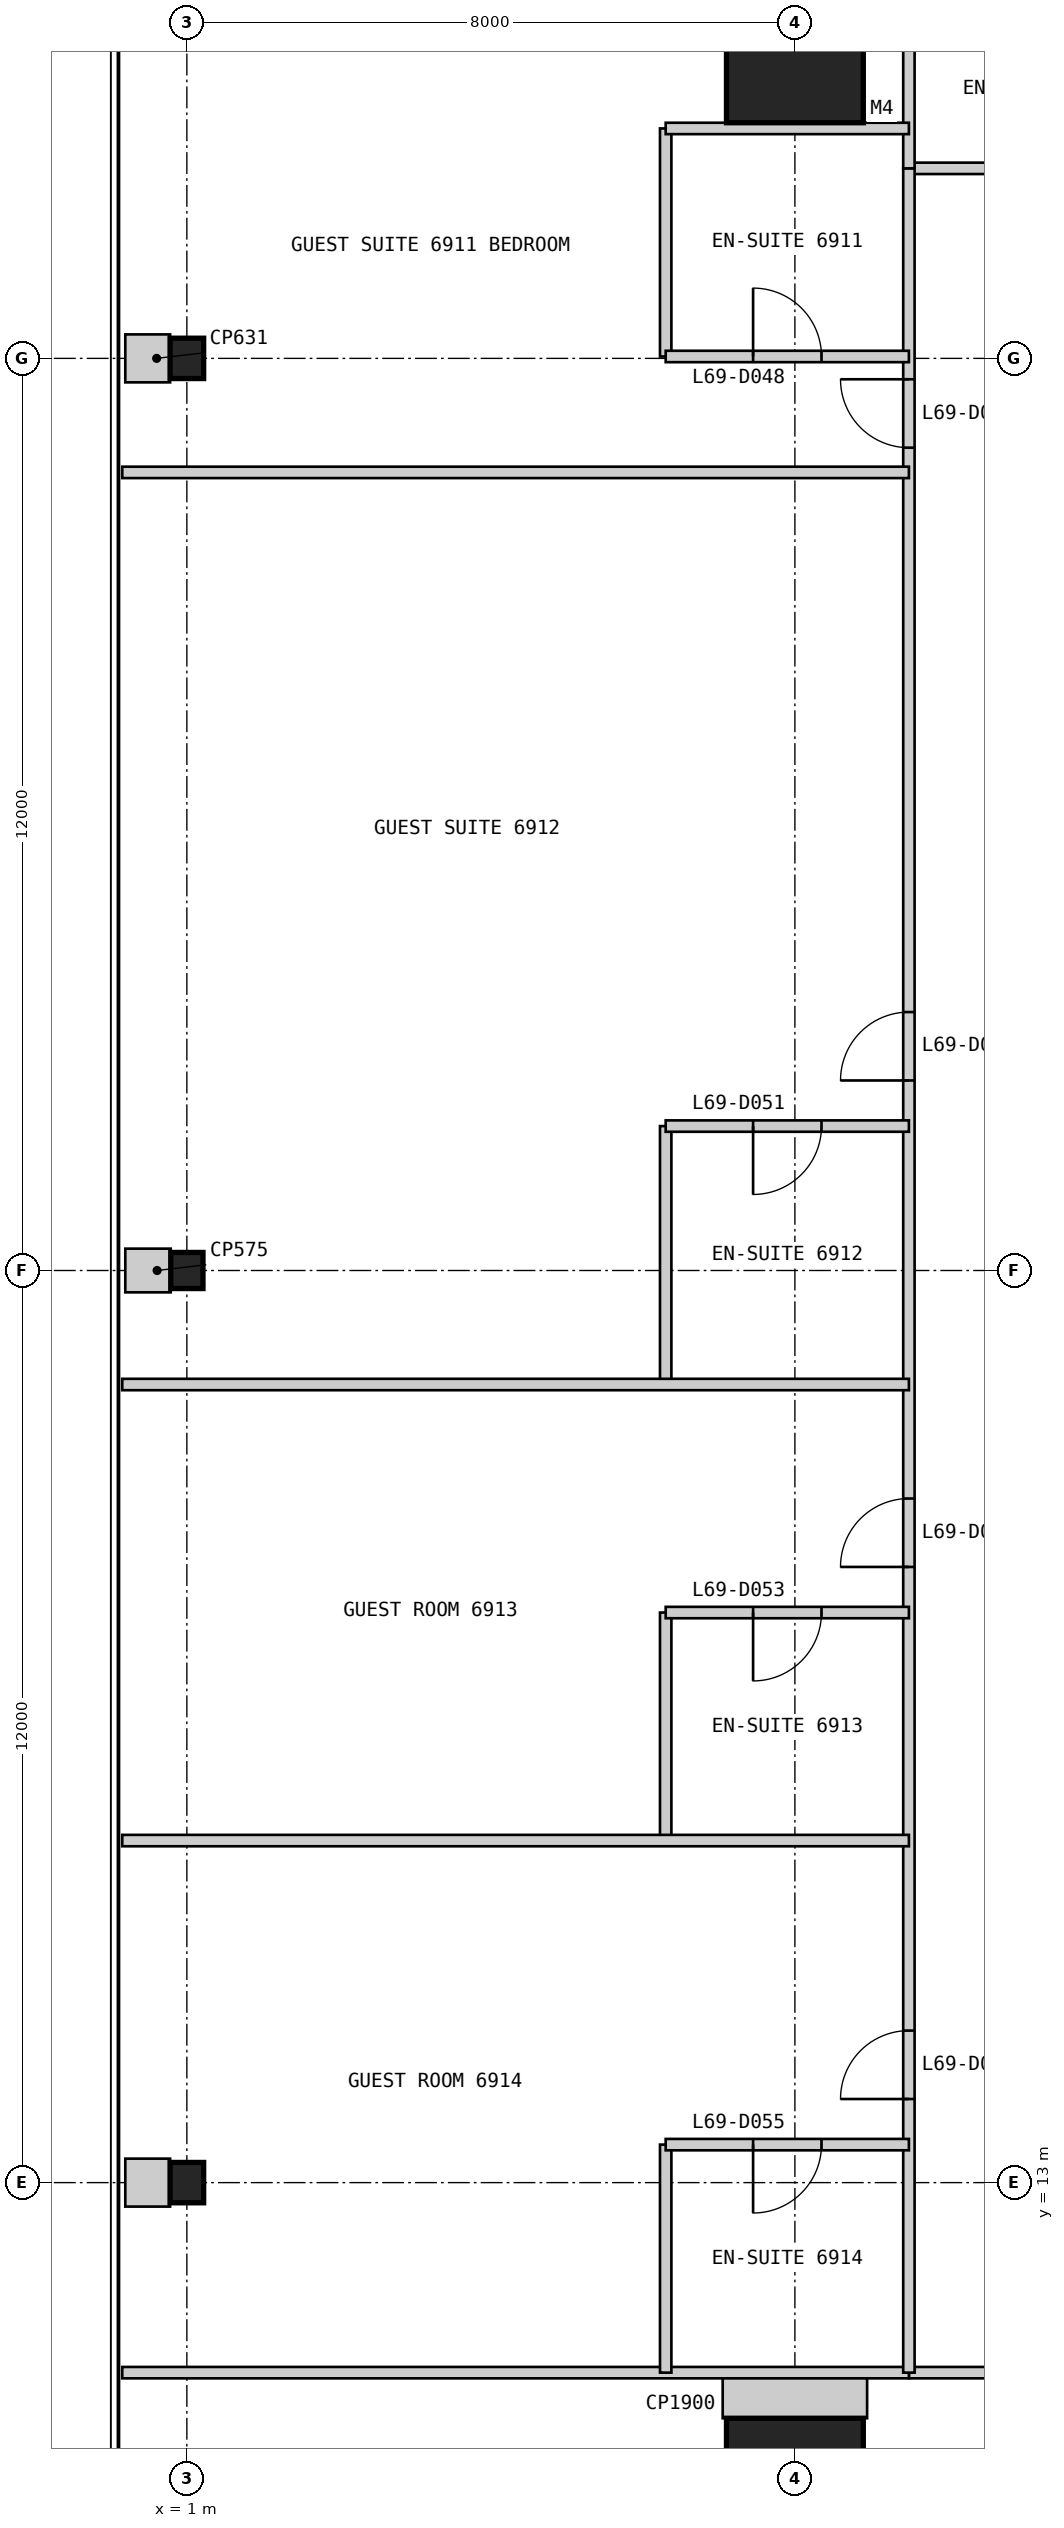
"""IFC4 building model, lengths in metres.
Left out: names, types, materials, properties, quantities, classifications, styles, units other than length and angle.
Written with IfcOpenShell. Run it as: python <this file> out.ifc"""

import sys

from ifc_helpers import new_model, si_unit, direction, frame, frame_2d, origin, origin_2d, place, context, subcontext, project, spatial, rectangle, i_section, extrude, element, fill, save


model = new_model("IFC4")
c1 = context("Model", 3, precision=1e-05, world=origin(), true_north=direction((0.0, 1.0)))
c2 = subcontext(c1, "Body", "Model", "MODEL_VIEW")
j1 = project(units=[si_unit("LENGTHUNIT", "METRE"), si_unit("PLANEANGLEUNIT", "RADIAN")], contexts=[c1])
p1 = place(None, origin())
s1 = spatial("IfcSite", under=j1, at=p1, CompositionType="ELEMENT")
p2 = place(p1, origin())
s2 = spatial("IfcBuilding", under=s1, at=p2, CompositionType="ELEMENT")
p3 = place(p2, frame((0.0, 0.0, 286.6)))
s3 = spatial("IfcBuildingStorey", under=s2, at=p3, CompositionType="ELEMENT", Elevation=286.6)
for number, where, z_axis, x_axis in (
    (1, (9.0, 9.0, 0.0), (0.0, 0.0, 1.0), (1.0, 0.0, 0.0)),
    (2, (9.0, 41.0, 0.0), (0.0, 0.0, 1.0), (1.0, 0.0, 0.0)),
):
    element("IfcColumn", number, at=place(p3, frame(where, z_axis=z_axis, x_axis=x_axis)), inside=s3, PredefinedType="COLUMN", context=c2, shape_type="SweptSolid", body=[
        extrude(rectangle(XDim=1.8, YDim=1.8, at=origin_2d()), origin(), (0.0, 0.0, 1.0), 3.4),
    ])
p4 = place(p3, frame((1.0, 37.0, 0.0), z_axis=(0.0, 0.0, 1.0), x_axis=(1.0, 0.0, 0.0)))
e3 = element("IfcColumn", 3, at=p4, inside=s3, PredefinedType="COLUMN", context=c2, shape_type="SweptSolid", body=[
    extrude(i_section(OverallWidth=0.442, OverallDepth=0.531, WebThickness=0.066, FlangeThickness=0.106, at=origin_2d()), origin(), (0.0, 0.0, 1.0), 3.4),
])
p5 = place(p3, frame((1.0, 25.0, 0.0), z_axis=(0.0, 0.0, 1.0), x_axis=(1.0, 0.0, 0.0)))
e4 = element("IfcColumn", 4, at=p5, inside=s3, PredefinedType="COLUMN", context=c2, shape_type="SweptSolid", body=[
    extrude(i_section(OverallWidth=0.424, OverallDepth=0.475, WebThickness=0.048, FlangeThickness=0.077, at=origin_2d()), origin(), (0.0, 0.0, 1.0), 3.4),
])
p6 = place(p3, frame((1.0, 13.0, 0.0), z_axis=(0.0, 0.0, 1.0), x_axis=(1.0, 0.0, 0.0)))
e5 = element("IfcColumn", 5, at=p6, inside=s3, PredefinedType="COLUMN", context=c2, shape_type="SweptSolid", body=[
    extrude(i_section(OverallWidth=0.442, OverallDepth=0.531, WebThickness=0.066, FlangeThickness=0.106, at=origin_2d()), origin(), (0.0, 0.0, 1.0), 3.4),
])
p7 = place(p3, frame((10.5, 10.5, 0.0), z_axis=(0.0, 0.0, 1.0), x_axis=(1.0, 0.0, 0.0)))
e6 = element("IfcWall", 6, at=p7, inside=s3, PredefinedType="PARTITIONING", context=c2, shape_type="SweptSolid", body=[
    extrude(rectangle(XDim=29.0, YDim=0.15, at=frame_2d((14.5, 0.0))), origin(), (0.0, 0.0, 1.0), 3.25),
])
p8 = place(p7, frame((1.85, 0.0, 0.0)))
e7 = element("IfcOpeningElement", 7, at=p8, cuts=e6, PredefinedType="OPENING", context=c2, shape_type="SweptSolid", body=[
    extrude(rectangle(XDim=0.9, YDim=2.1, at=frame_2d((0.45, 1.05))), frame((0.0, 0.085, 0.0), z_axis=(0.0, -1.0, 0.0), x_axis=(1.0, 0.0, 0.0)), (0.0, 0.0, 1.0), 0.17),
])
p9 = place(p7, frame((11.5, 0.0, 0.0)))
e8 = element("IfcOpeningElement", 8, at=p9, cuts=e6, PredefinedType="OPENING", context=c2, shape_type="SweptSolid", body=[
    extrude(rectangle(XDim=0.9, YDim=2.1, at=frame_2d((0.45, 1.05))), frame((0.0, 0.085, 0.0), z_axis=(0.0, -1.0, 0.0), x_axis=(1.0, 0.0, 0.0)), (0.0, 0.0, 1.0), 0.17),
])
p10 = place(p7, frame((24.1, 0.0, 0.0)))
e9 = element("IfcOpeningElement", 9, at=p10, cuts=e6, PredefinedType="OPENING", context=c2, shape_type="SweptSolid", body=[
    extrude(rectangle(XDim=0.9, YDim=2.1, at=frame_2d((0.45, 1.05))), frame((0.0, 0.085, 0.0), z_axis=(0.0, -1.0, 0.0), x_axis=(1.0, 0.0, 0.0)), (0.0, 0.0, 1.0), 0.17),
])
p11 = place(p3, frame((0.15, 10.5, 0.0), z_axis=(0.0, 0.0, 1.0), x_axis=(1.0, 0.0, 0.0)))
e10 = element("IfcWall", 10, at=p11, inside=s3, PredefinedType="PARTITIONING", context=c2, shape_type="SweptSolid", body=[
    extrude(rectangle(XDim=10.35, YDim=0.15, at=frame_2d((5.175, 0.0))), origin(), (0.0, 0.0, 1.0), 3.25),
])
p12 = place(p3, frame((39.5, 39.5, 0.0), z_axis=(0.0, 0.0, 1.0), x_axis=(-1.0, 0.0, 0.0)))
e11 = element("IfcWall", 11, at=p12, inside=s3, PredefinedType="PARTITIONING", context=c2, shape_type="SweptSolid", body=[
    extrude(rectangle(XDim=29.0, YDim=0.15, at=frame_2d((14.5, 0.0))), origin(), (0.0, 0.0, 1.0), 3.25),
])
p13 = place(p12, frame((1.85, 0.0, 0.0)))
e12 = element("IfcOpeningElement", 12, at=p13, cuts=e11, PredefinedType="OPENING", context=c2, shape_type="SweptSolid", body=[
    extrude(rectangle(XDim=0.9, YDim=2.1, at=frame_2d((0.45, 1.05))), frame((0.0, 0.085, 0.0), z_axis=(0.0, -1.0, 0.0), x_axis=(1.0, 0.0, 0.0)), (0.0, 0.0, 1.0), 0.17),
])
p14 = place(p12, frame((11.5, 0.0, 0.0)))
e13 = element("IfcOpeningElement", 13, at=p14, cuts=e11, PredefinedType="OPENING", context=c2, shape_type="SweptSolid", body=[
    extrude(rectangle(XDim=0.9, YDim=2.1, at=frame_2d((0.45, 1.05))), frame((0.0, 0.085, 0.0), z_axis=(0.0, -1.0, 0.0), x_axis=(1.0, 0.0, 0.0)), (0.0, 0.0, 1.0), 0.17),
])
p15 = place(p12, frame((24.1, 0.0, 0.0)))
e14 = element("IfcOpeningElement", 14, at=p15, cuts=e11, PredefinedType="OPENING", context=c2, shape_type="SweptSolid", body=[
    extrude(rectangle(XDim=0.9, YDim=2.1, at=frame_2d((0.45, 1.05))), frame((0.0, 0.085, 0.0), z_axis=(0.0, -1.0, 0.0), x_axis=(1.0, 0.0, 0.0)), (0.0, 0.0, 1.0), 0.17),
])
p16 = place(p3, frame((10.5, 39.5, 0.0), z_axis=(0.0, 0.0, 1.0), x_axis=(0.0, -1.0, 0.0)))
e15 = element("IfcWall", 15, at=p16, inside=s3, PredefinedType="PARTITIONING", context=c2, shape_type="SweptSolid", body=[
    extrude(rectangle(XDim=29.0, YDim=0.15, at=frame_2d((14.5, 0.0))), origin(), (0.0, 0.0, 1.0), 3.25),
])
p17 = place(p16, frame((2.775, 0.0, 0.0)))
e16 = element("IfcOpeningElement", 16, at=p17, cuts=e15, PredefinedType="OPENING", context=c2, shape_type="SweptSolid", body=[
    extrude(rectangle(XDim=0.9, YDim=2.1, at=frame_2d((0.45, 1.05))), frame((0.0, 0.085, 0.0), z_axis=(0.0, -1.0, 0.0), x_axis=(1.0, 0.0, 0.0)), (0.0, 0.0, 1.0), 0.17),
])
p18 = place(p16, frame((11.1, 0.0, 0.0)))
e17 = element("IfcOpeningElement", 17, at=p18, cuts=e15, PredefinedType="OPENING", context=c2, shape_type="SweptSolid", body=[
    extrude(rectangle(XDim=0.9, YDim=2.1, at=frame_2d((0.45, 1.05))), frame((0.0, 0.085, 0.0), z_axis=(0.0, -1.0, 0.0), x_axis=(1.0, 0.0, 0.0)), (0.0, 0.0, 1.0), 0.17),
])
p19 = place(p16, frame((17.5, 0.0, 0.0)))
e18 = element("IfcOpeningElement", 18, at=p19, cuts=e15, PredefinedType="OPENING", context=c2, shape_type="SweptSolid", body=[
    extrude(rectangle(XDim=0.9, YDim=2.1, at=frame_2d((0.45, 1.05))), frame((0.0, 0.085, 0.0), z_axis=(0.0, -1.0, 0.0), x_axis=(1.0, 0.0, 0.0)), (0.0, 0.0, 1.0), 0.17),
])
p20 = place(p16, frame((24.5, 0.0, 0.0)))
e19 = element("IfcOpeningElement", 19, at=p20, cuts=e15, PredefinedType="OPENING", context=c2, shape_type="SweptSolid", body=[
    extrude(rectangle(XDim=0.9, YDim=2.1, at=frame_2d((0.45, 1.05))), frame((0.0, 0.085, 0.0), z_axis=(0.0, -1.0, 0.0), x_axis=(1.0, 0.0, 0.0)), (0.0, 0.0, 1.0), 0.17),
])
p21 = place(p3, frame((10.5, 49.85, 0.0), z_axis=(0.0, 0.0, 1.0), x_axis=(0.0, -1.0, 0.0)))
e20 = element("IfcWall", 20, at=p21, inside=s3, PredefinedType="PARTITIONING", context=c2, shape_type="SweptSolid", body=[
    extrude(rectangle(XDim=10.35, YDim=0.15, at=frame_2d((5.175, 0.0))), origin(), (0.0, 0.0, 1.0), 3.25),
])
p22 = place(p3, frame((7.3, 40.025, 0.0), z_axis=(0.0, 0.0, 1.0), x_axis=(0.0, -1.0, 0.0)))
e21 = element("IfcWall", 21, at=p22, inside=s3, PredefinedType="PARTITIONING", context=c2, shape_type="SweptSolid", body=[
    extrude(rectangle(XDim=3.0, YDim=0.15, at=frame_2d((1.5, 0.0))), origin(), (0.0, 0.0, 1.0), 3.25),
])
p23 = place(p3, frame((7.3, 37.025, 0.0), z_axis=(0.0, 0.0, 1.0), x_axis=(1.0, 0.0, 0.0)))
e22 = element("IfcWall", 22, at=p23, inside=s3, PredefinedType="PARTITIONING", context=c2, shape_type="SweptSolid", body=[
    extrude(rectangle(XDim=3.2, YDim=0.15, at=frame_2d((1.6, 0.0))), origin(), (0.0, 0.0, 1.0), 2.404),
])
p24 = place(p23, frame((1.15, 0.0, 0.0)))
e23 = element("IfcOpeningElement", 23, at=p24, cuts=e22, PredefinedType="OPENING", context=c2, shape_type="SweptSolid", body=[
    extrude(rectangle(XDim=0.9, YDim=2.1, at=frame_2d((0.45, 1.05))), frame((0.0, 0.085, 0.0), z_axis=(0.0, -1.0, 0.0), x_axis=(1.0, 0.0, 0.0)), (0.0, 0.0, 1.0), 0.17),
])
p25 = place(p3, frame((7.3, 40.025, 0.0), z_axis=(0.0, 0.0, 1.0), x_axis=(1.0, 0.0, 0.0)))
e24 = element("IfcWall", 24, at=p25, inside=s3, PredefinedType="PARTITIONING", context=c2, shape_type="SweptSolid", body=[
    extrude(rectangle(XDim=3.2, YDim=0.15, at=frame_2d((1.6, 0.0))), origin(), (0.0, 0.0, 1.0), 3.25),
])
p26 = place(p3, frame((0.15, 35.5, 0.0), z_axis=(0.0, 0.0, 1.0), x_axis=(1.0, 0.0, 0.0)))
e25 = element("IfcWall", 25, at=p26, inside=s3, PredefinedType="PARTITIONING", context=c2, shape_type="SweptSolid", body=[
    extrude(rectangle(XDim=10.35, YDim=0.15, at=frame_2d((5.175, 0.0))), origin(), (0.0, 0.0, 1.0), 3.25),
])
p27 = place(p3, frame((7.3, 26.9, 0.0), z_axis=(0.0, 0.0, 1.0), x_axis=(0.0, -1.0, 0.0)))
e26 = element("IfcWall", 26, at=p27, inside=s3, PredefinedType="PARTITIONING", context=c2, shape_type="SweptSolid", body=[
    extrude(rectangle(XDim=3.4, YDim=0.15, at=frame_2d((1.7, 0.0))), origin(), (0.0, 0.0, 1.0), 3.25),
])
p28 = place(p3, frame((7.3, 26.9, 0.0), z_axis=(0.0, 0.0, 1.0), x_axis=(1.0, 0.0, 0.0)))
e27 = element("IfcWall", 27, at=p28, inside=s3, PredefinedType="PARTITIONING", context=c2, shape_type="SweptSolid", body=[
    extrude(rectangle(XDim=3.2, YDim=0.15, at=frame_2d((1.6, 0.0))), origin(), (0.0, 0.0, 1.0), 3.25),
])
p29 = place(p28, frame((1.15, 0.0, 0.0)))
e28 = element("IfcOpeningElement", 28, at=p29, cuts=e27, PredefinedType="OPENING", context=c2, shape_type="SweptSolid", body=[
    extrude(rectangle(XDim=0.9, YDim=2.1, at=frame_2d((0.45, 1.05))), frame((0.0, 0.085, 0.0), z_axis=(0.0, -1.0, 0.0), x_axis=(1.0, 0.0, 0.0)), (0.0, 0.0, 1.0), 0.17),
])
p30 = place(p3, frame((0.15, 23.5, 0.0), z_axis=(0.0, 0.0, 1.0), x_axis=(1.0, 0.0, 0.0)))
e29 = element("IfcWall", 29, at=p30, inside=s3, PredefinedType="PARTITIONING", context=c2, shape_type="SweptSolid", body=[
    extrude(rectangle(XDim=10.35, YDim=0.15, at=frame_2d((5.175, 0.0))), origin(), (0.0, 0.0, 1.0), 3.25),
])
p31 = place(p3, frame((7.3, 20.5, 0.0), z_axis=(0.0, 0.0, 1.0), x_axis=(0.0, -1.0, 0.0)))
e30 = element("IfcWall", 30, at=p31, inside=s3, PredefinedType="PARTITIONING", context=c2, shape_type="SweptSolid", body=[
    extrude(rectangle(XDim=3.0, YDim=0.15, at=frame_2d((1.5, 0.0))), origin(), (0.0, 0.0, 1.0), 3.25),
])
p32 = place(p3, frame((7.3, 20.5, 0.0), z_axis=(0.0, 0.0, 1.0), x_axis=(1.0, 0.0, 0.0)))
e31 = element("IfcWall", 31, at=p32, inside=s3, PredefinedType="PARTITIONING", context=c2, shape_type="SweptSolid", body=[
    extrude(rectangle(XDim=3.2, YDim=0.15, at=frame_2d((1.6, 0.0))), origin(), (0.0, 0.0, 1.0), 3.25),
])
p33 = place(p32, frame((1.15, 0.0, 0.0)))
e32 = element("IfcOpeningElement", 32, at=p33, cuts=e31, PredefinedType="OPENING", context=c2, shape_type="SweptSolid", body=[
    extrude(rectangle(XDim=0.9, YDim=2.1, at=frame_2d((0.45, 1.05))), frame((0.0, 0.085, 0.0), z_axis=(0.0, -1.0, 0.0), x_axis=(1.0, 0.0, 0.0)), (0.0, 0.0, 1.0), 0.17),
])
p34 = place(p3, frame((0.15, 17.5, 0.0), z_axis=(0.0, 0.0, 1.0), x_axis=(1.0, 0.0, 0.0)))
e33 = element("IfcWall", 33, at=p34, inside=s3, PredefinedType="PARTITIONING", context=c2, shape_type="SweptSolid", body=[
    extrude(rectangle(XDim=10.35, YDim=0.15, at=frame_2d((5.175, 0.0))), origin(), (0.0, 0.0, 1.0), 3.25),
])
p35 = place(p3, frame((7.3, 13.5, 0.0), z_axis=(0.0, 0.0, 1.0), x_axis=(0.0, -1.0, 0.0)))
e34 = element("IfcWall", 34, at=p35, inside=s3, PredefinedType="PARTITIONING", context=c2, shape_type="SweptSolid", body=[
    extrude(rectangle(XDim=3.0, YDim=0.15, at=frame_2d((1.5, 0.0))), origin(), (0.0, 0.0, 1.0), 3.25),
])
p36 = place(p3, frame((7.3, 13.5, 0.0), z_axis=(0.0, 0.0, 1.0), x_axis=(1.0, 0.0, 0.0)))
e35 = element("IfcWall", 35, at=p36, inside=s3, PredefinedType="PARTITIONING", context=c2, shape_type="SweptSolid", body=[
    extrude(rectangle(XDim=3.2, YDim=0.15, at=frame_2d((1.6, 0.0))), origin(), (0.0, 0.0, 1.0), 3.25),
])
p37 = place(p36, frame((1.15, 0.0, 0.0)))
e36 = element("IfcOpeningElement", 36, at=p37, cuts=e35, PredefinedType="OPENING", context=c2, shape_type="SweptSolid", body=[
    extrude(rectangle(XDim=0.9, YDim=2.1, at=frame_2d((0.45, 1.05))), frame((0.0, 0.085, 0.0), z_axis=(0.0, -1.0, 0.0), x_axis=(1.0, 0.0, 0.0)), (0.0, 0.0, 1.0), 0.17),
])
p38 = place(p3, frame((9.0, 10.425, 0.0), z_axis=(0.0, 0.0, 1.0), x_axis=(0.0, -1.0, 0.0)))
e37 = element("IfcWall", 37, at=p38, inside=s3, PredefinedType="PARTITIONING", context=c2, shape_type="SweptSolid", body=[
    extrude(rectangle(XDim=0.525, YDim=1.9, at=frame_2d((0.263, 0.0))), origin(), (0.0, 0.0, 1.0), 3.25),
])
p39 = place(p3, frame((0.19, 37.0, 0.0), z_axis=(0.0, 0.0, 1.0), x_axis=(1.0, 0.0, 0.0)))
e38 = element("IfcWall", 38, at=p39, inside=s3, PredefinedType="PARTITIONING", context=c2, shape_type="SweptSolid", body=[
    extrude(rectangle(XDim=0.589, YDim=0.631, at=frame_2d((0.294, 0.0))), origin(), (0.0, 0.0, 1.0), 3.25),
])
p40 = place(p3, frame((0.19, 25.0, 0.0), z_axis=(0.0, 0.0, 1.0), x_axis=(1.0, 0.0, 0.0)))
e39 = element("IfcWall", 39, at=p40, inside=s3, PredefinedType="PARTITIONING", context=c2, shape_type="SweptSolid", body=[
    extrude(rectangle(XDim=0.598, YDim=0.575, at=frame_2d((0.299, 0.0))), origin(), (0.0, 0.0, 1.0), 3.25),
])
p41 = place(p3, frame((0.19, 13.0, 0.0), z_axis=(0.0, 0.0, 1.0), x_axis=(1.0, 0.0, 0.0)))
e40 = element("IfcWall", 40, at=p41, inside=s3, PredefinedType="PARTITIONING", context=c2, shape_type="SweptSolid", body=[
    extrude(rectangle(XDim=0.589, YDim=0.631, at=frame_2d((0.294, 0.0))), origin(), (0.0, 0.0, 1.0), 3.25),
])
p42 = place(p24, origin())
e41 = element("IfcDoor", 41, at=p42, inside=s3, OperationType="SINGLE_SWING_LEFT", PredefinedType="DOOR", context=c2, shape_type="SweptSolid", body=[
    extrude(rectangle(XDim=0.9, YDim=2.1, at=frame_2d((0.45, 1.05))), frame((0.0, 0.025, 0.0), z_axis=(0.0, -1.0, 0.0), x_axis=(1.0, 0.0, 0.0)), (0.0, 0.0, 1.0), 0.05),
])
fill(e23, e41)
p43 = place(p17, frame((0.9, 0.0, 0.0), z_axis=(0.0, 0.0, 1.0), x_axis=(-1.0, 0.0, 0.0)))
e42 = element("IfcDoor", 42, at=p43, inside=s3, OperationType="SINGLE_SWING_RIGHT", PredefinedType="DOOR", context=c2, shape_type="SweptSolid", body=[
    extrude(rectangle(XDim=0.9, YDim=2.1, at=frame_2d((0.45, 1.05))), frame((0.0, 0.025, 0.0), z_axis=(0.0, -1.0, 0.0), x_axis=(1.0, 0.0, 0.0)), (0.0, 0.0, 1.0), 0.05),
])
fill(e16, e42)
p44 = place(p29, frame((0.9, 0.0, 0.0), z_axis=(0.0, 0.0, 1.0), x_axis=(-1.0, 0.0, 0.0)))
e43 = element("IfcDoor", 43, at=p44, inside=s3, OperationType="SINGLE_SWING_RIGHT", PredefinedType="DOOR", context=c2, shape_type="SweptSolid", body=[
    extrude(rectangle(XDim=0.9, YDim=2.1, at=frame_2d((0.45, 1.05))), frame((0.0, 0.025, 0.0), z_axis=(0.0, -1.0, 0.0), x_axis=(1.0, 0.0, 0.0)), (0.0, 0.0, 1.0), 0.05),
])
fill(e28, e43)
p45 = place(p18, frame((0.9, 0.0, 0.0), z_axis=(0.0, 0.0, 1.0), x_axis=(-1.0, 0.0, 0.0)))
e44 = element("IfcDoor", 44, at=p45, inside=s3, OperationType="SINGLE_SWING_LEFT", PredefinedType="DOOR", context=c2, shape_type="SweptSolid", body=[
    extrude(rectangle(XDim=0.9, YDim=2.1, at=frame_2d((0.45, 1.05))), frame((0.0, 0.025, 0.0), z_axis=(0.0, -1.0, 0.0), x_axis=(1.0, 0.0, 0.0)), (0.0, 0.0, 1.0), 0.05),
])
fill(e17, e44)
p46 = place(p33, frame((0.9, 0.0, 0.0), z_axis=(0.0, 0.0, 1.0), x_axis=(-1.0, 0.0, 0.0)))
e45 = element("IfcDoor", 45, at=p46, inside=s3, OperationType="SINGLE_SWING_RIGHT", PredefinedType="DOOR", context=c2, shape_type="SweptSolid", body=[
    extrude(rectangle(XDim=0.9, YDim=2.1, at=frame_2d((0.45, 1.05))), frame((0.0, 0.025, 0.0), z_axis=(0.0, -1.0, 0.0), x_axis=(1.0, 0.0, 0.0)), (0.0, 0.0, 1.0), 0.05),
])
fill(e32, e45)
p47 = place(p19, frame((0.9, 0.0, 0.0), z_axis=(0.0, 0.0, 1.0), x_axis=(-1.0, 0.0, 0.0)))
e46 = element("IfcDoor", 46, at=p47, inside=s3, OperationType="SINGLE_SWING_LEFT", PredefinedType="DOOR", context=c2, shape_type="SweptSolid", body=[
    extrude(rectangle(XDim=0.9, YDim=2.1, at=frame_2d((0.45, 1.05))), frame((0.0, 0.025, 0.0), z_axis=(0.0, -1.0, 0.0), x_axis=(1.0, 0.0, 0.0)), (0.0, 0.0, 1.0), 0.05),
])
fill(e18, e46)
p48 = place(p37, frame((0.9, 0.0, 0.0), z_axis=(0.0, 0.0, 1.0), x_axis=(-1.0, 0.0, 0.0)))
e47 = element("IfcDoor", 47, at=p48, inside=s3, OperationType="SINGLE_SWING_RIGHT", PredefinedType="DOOR", context=c2, shape_type="SweptSolid", body=[
    extrude(rectangle(XDim=0.9, YDim=2.1, at=frame_2d((0.45, 1.05))), frame((0.0, 0.025, 0.0), z_axis=(0.0, -1.0, 0.0), x_axis=(1.0, 0.0, 0.0)), (0.0, 0.0, 1.0), 0.05),
])
fill(e36, e47)
p49 = place(p20, frame((0.9, 0.0, 0.0), z_axis=(0.0, 0.0, 1.0), x_axis=(-1.0, 0.0, 0.0)))
e48 = element("IfcDoor", 48, at=p49, inside=s3, OperationType="SINGLE_SWING_LEFT", PredefinedType="DOOR", context=c2, shape_type="SweptSolid", body=[
    extrude(rectangle(XDim=0.9, YDim=2.1, at=frame_2d((0.45, 1.05))), frame((0.0, 0.025, 0.0), z_axis=(0.0, -1.0, 0.0), x_axis=(1.0, 0.0, 0.0)), (0.0, 0.0, 1.0), 0.05),
])
fill(e19, e48)
save(model, sys.argv[1])
